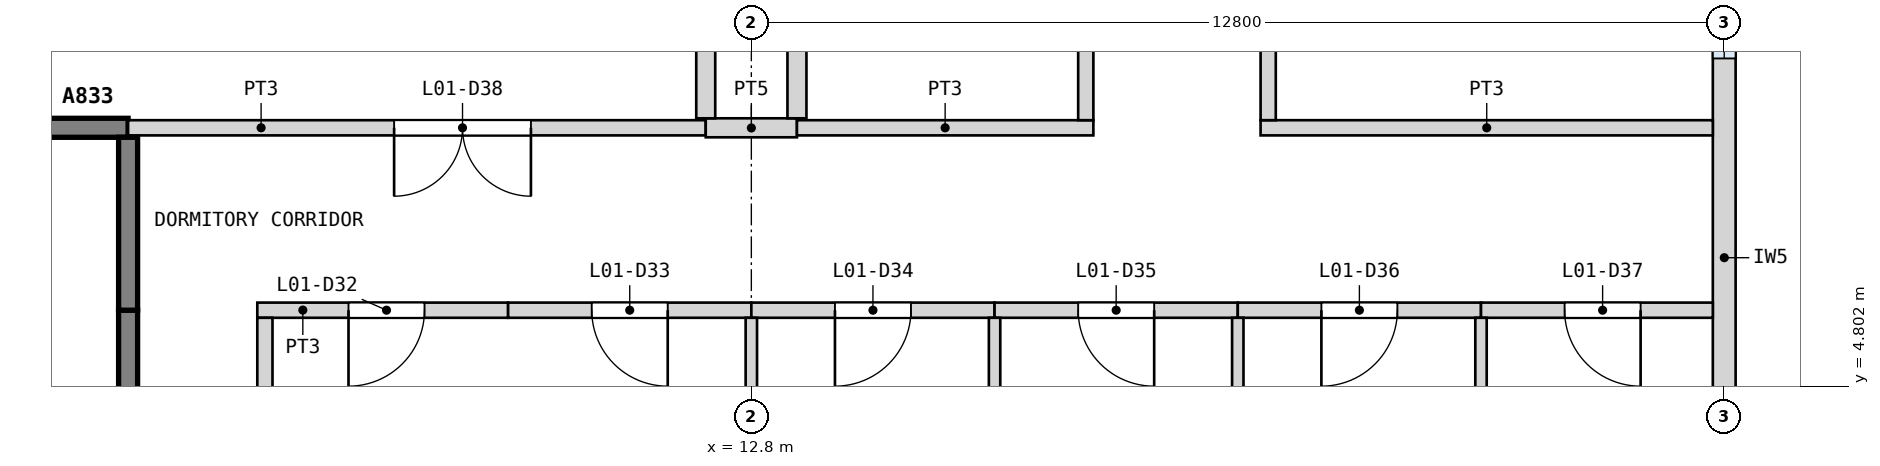
"""IFC4 building model, lengths in metres.
Left out: names, types, materials, properties, quantities, classifications, styles, units other than length and angle.
Written with IfcOpenShell. Run it as: python <this file> out.ifc"""

import sys

from ifc_helpers import new_model, si_unit, direction, frame, frame_2d, origin, place, context, subcontext, project, spatial, rectangle, extrude, element, fill, save


model = new_model("IFC4")
c1 = context("Model", 3, precision=1e-05, world=origin(), true_north=direction((0.0, 1.0)))
c2 = subcontext(c1, "Body", "Model", "MODEL_VIEW")
j1 = project(units=[si_unit("LENGTHUNIT", "METRE"), si_unit("PLANEANGLEUNIT", "RADIAN")], contexts=[c1])
p1 = place(None, origin())
s1 = spatial("IfcSite", under=j1, at=p1, CompositionType="ELEMENT")
p2 = place(p1, origin())
s2 = spatial("IfcBuilding", under=s1, at=p2, CompositionType="ELEMENT")
p3 = place(p2, frame((0.0, 0.0, 4.2)))
s3 = spatial("IfcBuildingStorey", under=s2, at=p3, CompositionType="ELEMENT", Elevation=4.2)
p4 = place(p3, frame((25.6, 0.3, 0.0), z_axis=(0.0, 0.0, 1.0), x_axis=(0.0, 1.0, 0.0)))
e1 = element("IfcWall", 1, at=p4, inside=s3, PredefinedType="SOLIDWALL", context=c2, shape_type="SweptSolid", body=[
    extrude(rectangle(XDim=13.8, YDim=0.3, at=frame_2d((6.9, 0.0))), origin(), (0.0, 0.0, 1.0), 2.9),
])
p5 = place(p4, frame((1.975, 0.0, 1.0)))
e2 = element("IfcOpeningElement", 2, at=p5, cuts=e1, PredefinedType="OPENING", context=c2, shape_type="SweptSolid", body=[
    extrude(rectangle(XDim=1.6, YDim=1.8, at=frame_2d((0.8, 0.9))), frame((0.0, 0.16, 0.0), z_axis=(0.0, -1.0, 0.0), x_axis=(1.0, 0.0, 0.0)), (0.0, 0.0, 1.0), 0.32),
])
p6 = place(p4, frame((8.812, 0.0, 1.0)))
e3 = element("IfcOpeningElement", 3, at=p6, cuts=e1, PredefinedType="OPENING", context=c2, shape_type="SweptSolid", body=[
    extrude(rectangle(XDim=1.6, YDim=1.8, at=frame_2d((0.8, 0.9))), frame((0.0, 0.16, 0.0), z_axis=(0.0, -1.0, 0.0), x_axis=(1.0, 0.0, 0.0)), (0.0, 0.0, 1.0), 0.32),
])
p7 = place(p4, frame((11.712, 0.0, 1.0)))
e4 = element("IfcOpeningElement", 4, at=p7, cuts=e1, PredefinedType="OPENING", context=c2, shape_type="SweptSolid", body=[
    extrude(rectangle(XDim=1.6, YDim=1.8, at=frame_2d((0.8, 0.9))), frame((0.0, 0.16, 0.0), z_axis=(0.0, -1.0, 0.0), x_axis=(1.0, 0.0, 0.0)), (0.0, 0.0, 1.0), 0.32),
])
p8 = place(p3, frame((6.3, 5.8, 0.0), z_axis=(0.0, 0.0, 1.0), x_axis=(1.0, 0.0, 0.0)))
e5 = element("IfcWall", 5, at=p8, inside=s3, PredefinedType="PARTITIONING", context=c2, shape_type="SweptSolid", body=[
    extrude(rectangle(XDim=3.3, YDim=0.2, at=frame_2d((1.65, 0.0))), origin(), (0.0, 0.0, 1.0), 3.9),
])
p9 = place(p8, frame((1.2, 0.0, 0.0)))
e6 = element("IfcOpeningElement", 6, at=p9, cuts=e5, PredefinedType="OPENING", context=c2, shape_type="SweptSolid", body=[
    extrude(rectangle(XDim=1.0, YDim=2.1, at=frame_2d((0.5, 1.05))), frame((0.0, 0.11, 0.0), z_axis=(0.0, -1.0, 0.0), x_axis=(1.0, 0.0, 0.0)), (0.0, 0.0, 1.0), 0.22),
])
p10 = place(p3, frame((9.6, 5.8, 0.0), z_axis=(0.0, 0.0, 1.0), x_axis=(1.0, 0.0, 0.0)))
e7 = element("IfcWall", 7, at=p10, inside=s3, PredefinedType="PARTITIONING", context=c2, shape_type="SweptSolid", body=[
    extrude(rectangle(XDim=3.2, YDim=0.2, at=frame_2d((1.6, 0.0))), origin(), (0.0, 0.0, 1.0), 3.9),
])
p11 = place(p10, frame((1.1, 0.0, 0.0)))
e8 = element("IfcOpeningElement", 8, at=p11, cuts=e7, PredefinedType="OPENING", context=c2, shape_type="SweptSolid", body=[
    extrude(rectangle(XDim=1.0, YDim=2.1, at=frame_2d((0.5, 1.05))), frame((0.0, 0.11, 0.0), z_axis=(0.0, -1.0, 0.0), x_axis=(1.0, 0.0, 0.0)), (0.0, 0.0, 1.0), 0.22),
])
p12 = place(p3, frame((12.8, 5.8, 0.0), z_axis=(0.0, 0.0, 1.0), x_axis=(1.0, 0.0, 0.0)))
e9 = element("IfcWall", 9, at=p12, inside=s3, PredefinedType="PARTITIONING", context=c2, shape_type="SweptSolid", body=[
    extrude(rectangle(XDim=3.2, YDim=0.2, at=frame_2d((1.6, 0.0))), origin(), (0.0, 0.0, 1.0), 3.9),
])
p13 = place(p12, frame((1.1, 0.0, 0.0)))
e10 = element("IfcOpeningElement", 10, at=p13, cuts=e9, PredefinedType="OPENING", context=c2, shape_type="SweptSolid", body=[
    extrude(rectangle(XDim=1.0, YDim=2.1, at=frame_2d((0.5, 1.05))), frame((0.0, 0.11, 0.0), z_axis=(0.0, -1.0, 0.0), x_axis=(1.0, 0.0, 0.0)), (0.0, 0.0, 1.0), 0.22),
])
p14 = place(p3, frame((16.0, 5.8, 0.0), z_axis=(0.0, 0.0, 1.0), x_axis=(1.0, 0.0, 0.0)))
e11 = element("IfcWall", 11, at=p14, inside=s3, PredefinedType="PARTITIONING", context=c2, shape_type="SweptSolid", body=[
    extrude(rectangle(XDim=3.2, YDim=0.2, at=frame_2d((1.6, 0.0))), origin(), (0.0, 0.0, 1.0), 3.9),
])
p15 = place(p14, frame((1.1, 0.0, 0.0)))
e12 = element("IfcOpeningElement", 12, at=p15, cuts=e11, PredefinedType="OPENING", context=c2, shape_type="SweptSolid", body=[
    extrude(rectangle(XDim=1.0, YDim=2.1, at=frame_2d((0.5, 1.05))), frame((0.0, 0.11, 0.0), z_axis=(0.0, -1.0, 0.0), x_axis=(1.0, 0.0, 0.0)), (0.0, 0.0, 1.0), 0.22),
])
p16 = place(p3, frame((19.2, 5.8, 0.0), z_axis=(0.0, 0.0, 1.0), x_axis=(1.0, 0.0, 0.0)))
e13 = element("IfcWall", 13, at=p16, inside=s3, PredefinedType="PARTITIONING", context=c2, shape_type="SweptSolid", body=[
    extrude(rectangle(XDim=3.2, YDim=0.2, at=frame_2d((1.6, 0.0))), origin(), (0.0, 0.0, 1.0), 3.9),
])
p17 = place(p16, frame((1.1, 0.0, 0.0)))
e14 = element("IfcOpeningElement", 14, at=p17, cuts=e13, PredefinedType="OPENING", context=c2, shape_type="SweptSolid", body=[
    extrude(rectangle(XDim=1.0, YDim=2.1, at=frame_2d((0.5, 1.05))), frame((0.0, 0.11, 0.0), z_axis=(0.0, -1.0, 0.0), x_axis=(1.0, 0.0, 0.0)), (0.0, 0.0, 1.0), 0.22),
])
p18 = place(p3, frame((22.4, 5.8, 0.0), z_axis=(0.0, 0.0, 1.0), x_axis=(1.0, 0.0, 0.0)))
e15 = element("IfcWall", 15, at=p18, inside=s3, PredefinedType="PARTITIONING", context=c2, shape_type="SweptSolid", body=[
    extrude(rectangle(XDim=3.05, YDim=0.2, at=frame_2d((1.525, 0.0))), origin(), (0.0, 0.0, 1.0), 3.9),
])
p19 = place(p18, frame((1.1, 0.0, 0.0)))
e16 = element("IfcOpeningElement", 16, at=p19, cuts=e15, PredefinedType="OPENING", context=c2, shape_type="SweptSolid", body=[
    extrude(rectangle(XDim=1.0, YDim=2.1, at=frame_2d((0.5, 1.05))), frame((0.0, 0.11, 0.0), z_axis=(0.0, -1.0, 0.0), x_axis=(1.0, 0.0, 0.0)), (0.0, 0.0, 1.0), 0.22),
])
p20 = place(p3, frame((1.0, 8.2, 0.0), z_axis=(0.0, 0.0, 1.0), x_axis=(1.0, 0.0, 0.0)))
e17 = element("IfcWall", 17, at=p20, inside=s3, PredefinedType="SHEAR", context=c2, shape_type="SweptSolid", body=[
    extrude(rectangle(XDim=3.6, YDim=0.25, at=frame_2d((1.8, 0.0))), origin(), (0.0, 0.0, 1.0), 3.9),
])
p21 = place(p3, frame((4.6, 8.2, 0.0), z_axis=(0.0, 0.0, 1.0), x_axis=(1.0, 0.0, 0.0)))
e18 = element("IfcWall", 18, at=p21, inside=s3, PredefinedType="PARTITIONING", context=c2, shape_type="SweptSolid", body=[
    extrude(rectangle(XDim=7.6, YDim=0.2, at=frame_2d((3.8, 0.0))), origin(), (0.0, 0.0, 1.0), 3.9),
])
p22 = place(p21, frame((3.5, 0.0, 0.0)))
e19 = element("IfcOpeningElement", 19, at=p22, cuts=e18, PredefinedType="OPENING", context=c2, shape_type="SweptSolid", body=[
    extrude(rectangle(XDim=1.8, YDim=2.1, at=frame_2d((0.9, 1.05))), frame((0.0, 0.11, 0.0), z_axis=(0.0, -1.0, 0.0), x_axis=(1.0, 0.0, 0.0)), (0.0, 0.0, 1.0), 0.22),
])
p23 = place(p3, frame((12.2, 8.2, 0.0), z_axis=(0.0, 0.0, 1.0), x_axis=(1.0, 0.0, 0.0)))
e20 = element("IfcWall", 20, at=p23, inside=s3, PredefinedType="PARTITIONING", context=c2, shape_type="SweptSolid", body=[
    extrude(rectangle(XDim=1.2, YDim=0.25, at=frame_2d((0.6, 0.0))), origin(), (0.0, 0.0, 1.0), 3.9),
])
p24 = place(p3, frame((13.4, 8.2, 0.0), z_axis=(0.0, 0.0, 1.0), x_axis=(1.0, 0.0, 0.0)))
e21 = element("IfcWall", 21, at=p24, inside=s3, PredefinedType="PARTITIONING", context=c2, shape_type="SweptSolid", body=[
    extrude(rectangle(XDim=3.9, YDim=0.2, at=frame_2d((1.95, 0.0))), origin(), (0.0, 0.0, 1.0), 3.9),
])
p25 = place(p3, frame((19.5, 8.2, 0.0), z_axis=(0.0, 0.0, 1.0), x_axis=(1.0, 0.0, 0.0)))
e22 = element("IfcWall", 22, at=p25, inside=s3, PredefinedType="PARTITIONING", context=c2, shape_type="SweptSolid", body=[
    extrude(rectangle(XDim=5.95, YDim=0.2, at=frame_2d((2.975, 0.0))), origin(), (0.0, 0.0, 1.0), 3.9),
])
p26 = place(p3, frame((4.6, 2.325, 0.0), z_axis=(0.0, 0.0, 1.0), x_axis=(0.0, 1.0, 0.0)))
e23 = element("IfcWall", 23, at=p26, inside=s3, PredefinedType="SHEAR", context=c2, shape_type="SweptSolid", body=[
    extrude(rectangle(XDim=3.475, YDim=0.25, at=frame_2d((1.738, 0.0))), origin(), (0.0, 0.0, 1.0), 3.9),
])
p27 = place(p3, frame((4.6, 5.8, 0.0), z_axis=(0.0, 0.0, 1.0), x_axis=(0.0, 1.0, 0.0)))
e24 = element("IfcWall", 24, at=p27, inside=s3, PredefinedType="SHEAR", context=c2, shape_type="SweptSolid", body=[
    extrude(rectangle(XDim=2.275, YDim=0.25, at=frame_2d((1.137, 0.0))), origin(), (0.0, 0.0, 1.0), 3.9),
])
p28 = place(p3, frame((6.4, 0.15, 0.0), z_axis=(0.0, 0.0, 1.0), x_axis=(0.0, 1.0, 0.0)))
e25 = element("IfcWall", 25, at=p28, inside=s3, PredefinedType="PARTITIONING", context=c2, shape_type="SweptSolid", body=[
    extrude(rectangle(XDim=5.55, YDim=0.2, at=frame_2d((2.775, 0.0))), origin(), (0.0, 0.0, 1.0), 2.9),
])
p29 = place(p3, frame((12.2, 8.325, 0.0), z_axis=(0.0, 0.0, 1.0), x_axis=(0.0, 1.0, 0.0)))
e26 = element("IfcWall", 26, at=p29, inside=s3, PredefinedType="PARTITIONING", context=c2, shape_type="SweptSolid", body=[
    extrude(rectangle(XDim=10.025, YDim=0.25, at=frame_2d((5.013, 0.0))), origin(), (0.0, 0.0, 1.0), 3.9),
])
p30 = place(p3, frame((12.8, 0.27, 0.0), z_axis=(0.0, 0.0, 1.0), x_axis=(0.0, 1.0, 0.0)))
e27 = element("IfcWall", 27, at=p30, inside=s3, PredefinedType="PARTITIONING", context=c2, shape_type="SweptSolid", body=[
    extrude(rectangle(XDim=5.43, YDim=0.15, at=frame_2d((2.715, 0.0))), origin(), (0.0, 0.0, 1.0), 2.9),
])
p31 = place(p3, frame((13.4, 8.325, 0.0), z_axis=(0.0, 0.0, 1.0), x_axis=(0.0, 1.0, 0.0)))
e28 = element("IfcWall", 28, at=p31, inside=s3, PredefinedType="PARTITIONING", context=c2, shape_type="SweptSolid", body=[
    extrude(rectangle(XDim=3.188, YDim=0.25, at=frame_2d((1.594, 0.0))), origin(), (0.0, 0.0, 1.0), 3.9),
])
p32 = place(p3, frame((16.0, 0.15, 0.0), z_axis=(0.0, 0.0, 1.0), x_axis=(0.0, 1.0, 0.0)))
e29 = element("IfcWall", 29, at=p32, inside=s3, PredefinedType="PARTITIONING", context=c2, shape_type="SweptSolid", body=[
    extrude(rectangle(XDim=5.55, YDim=0.15, at=frame_2d((2.775, 0.0))), origin(), (0.0, 0.0, 1.0), 3.0),
])
p33 = place(p3, frame((17.2, 8.3, 0.0), z_axis=(0.0, 0.0, 1.0), x_axis=(0.0, 1.0, 0.0)))
e30 = element("IfcWall", 30, at=p33, inside=s3, PredefinedType="PARTITIONING", context=c2, shape_type="SweptSolid", body=[
    extrude(rectangle(XDim=3.212, YDim=0.2, at=frame_2d((1.606, 0.0))), origin(), (0.0, 0.0, 1.0), 3.9),
])
p34 = place(p33, frame((1.1, 0.0, 0.0)))
e31 = element("IfcOpeningElement", 31, at=p34, cuts=e30, PredefinedType="OPENING", context=c2, shape_type="SweptSolid", body=[
    extrude(rectangle(XDim=1.0, YDim=2.1, at=frame_2d((0.5, 1.05))), frame((0.0, 0.11, 0.0), z_axis=(0.0, -1.0, 0.0), x_axis=(1.0, 0.0, 0.0)), (0.0, 0.0, 1.0), 0.22),
])
p35 = place(p3, frame((19.2, 0.15, 0.0), z_axis=(0.0, 0.0, 1.0), x_axis=(0.0, 1.0, 0.0)))
e32 = element("IfcWall", 32, at=p35, inside=s3, PredefinedType="PARTITIONING", context=c2, shape_type="SweptSolid", body=[
    extrude(rectangle(XDim=5.55, YDim=0.15, at=frame_2d((2.775, 0.0))), origin(), (0.0, 0.0, 1.0), 2.9),
])
p36 = place(p3, frame((19.6, 8.3, 0.0), z_axis=(0.0, 0.0, 1.0), x_axis=(0.0, 1.0, 0.0)))
e33 = element("IfcWall", 33, at=p36, inside=s3, PredefinedType="PARTITIONING", context=c2, shape_type="SweptSolid", body=[
    extrude(rectangle(XDim=3.225, YDim=0.2, at=frame_2d((1.612, 0.0))), origin(), (0.0, 0.0, 1.0), 3.9),
])
p37 = place(p36, frame((1.1, 0.0, 0.0)))
e34 = element("IfcOpeningElement", 34, at=p37, cuts=e33, PredefinedType="OPENING", context=c2, shape_type="SweptSolid", body=[
    extrude(rectangle(XDim=1.0, YDim=2.1, at=frame_2d((0.5, 1.05))), frame((0.0, 0.11, 0.0), z_axis=(0.0, -1.0, 0.0), x_axis=(1.0, 0.0, 0.0)), (0.0, 0.0, 1.0), 0.22),
])
p38 = place(p3, frame((22.4, 0.15, 0.0), z_axis=(0.0, 0.0, 1.0), x_axis=(0.0, 1.0, 0.0)))
e35 = element("IfcWall", 35, at=p38, inside=s3, PredefinedType="PARTITIONING", context=c2, shape_type="SweptSolid", body=[
    extrude(rectangle(XDim=5.55, YDim=0.15, at=frame_2d((2.775, 0.0))), origin(), (0.0, 0.0, 1.0), 3.0),
])
p39 = place(p9, frame((1.0, 0.0, 0.0), z_axis=(0.0, 0.0, 1.0), x_axis=(-1.0, 0.0, 0.0)))
e36 = element("IfcDoor", 36, at=p39, inside=s3, OperationType="SINGLE_SWING_RIGHT", PredefinedType="DOOR", context=c2, shape_type="SweptSolid", body=[
    extrude(rectangle(XDim=1.0, YDim=2.1, at=frame_2d((0.5, 1.05))), frame((0.0, 0.025, 0.0), z_axis=(0.0, -1.0, 0.0), x_axis=(1.0, 0.0, 0.0)), (0.0, 0.0, 1.0), 0.05),
])
fill(e6, e36)
p40 = place(p11, frame((1.0, 0.0, 0.0), z_axis=(0.0, 0.0, 1.0), x_axis=(-1.0, 0.0, 0.0)))
e37 = element("IfcDoor", 37, at=p40, inside=s3, OperationType="SINGLE_SWING_LEFT", PredefinedType="DOOR", context=c2, shape_type="SweptSolid", body=[
    extrude(rectangle(XDim=1.0, YDim=2.1, at=frame_2d((0.5, 1.05))), frame((0.0, 0.025, 0.0), z_axis=(0.0, -1.0, 0.0), x_axis=(1.0, 0.0, 0.0)), (0.0, 0.0, 1.0), 0.05),
])
fill(e8, e37)
p41 = place(p13, frame((1.0, 0.0, 0.0), z_axis=(0.0, 0.0, 1.0), x_axis=(-1.0, 0.0, 0.0)))
e38 = element("IfcDoor", 38, at=p41, inside=s3, OperationType="SINGLE_SWING_RIGHT", PredefinedType="DOOR", context=c2, shape_type="SweptSolid", body=[
    extrude(rectangle(XDim=1.0, YDim=2.1, at=frame_2d((0.5, 1.05))), frame((0.0, 0.025, 0.0), z_axis=(0.0, -1.0, 0.0), x_axis=(1.0, 0.0, 0.0)), (0.0, 0.0, 1.0), 0.05),
])
fill(e10, e38)
p42 = place(p15, frame((1.0, 0.0, 0.0), z_axis=(0.0, 0.0, 1.0), x_axis=(-1.0, 0.0, 0.0)))
e39 = element("IfcDoor", 39, at=p42, inside=s3, OperationType="SINGLE_SWING_LEFT", PredefinedType="DOOR", context=c2, shape_type="SweptSolid", body=[
    extrude(rectangle(XDim=1.0, YDim=2.1, at=frame_2d((0.5, 1.05))), frame((0.0, 0.025, 0.0), z_axis=(0.0, -1.0, 0.0), x_axis=(1.0, 0.0, 0.0)), (0.0, 0.0, 1.0), 0.05),
])
fill(e12, e39)
p43 = place(p17, frame((1.0, 0.0, 0.0), z_axis=(0.0, 0.0, 1.0), x_axis=(-1.0, 0.0, 0.0)))
e40 = element("IfcDoor", 40, at=p43, inside=s3, OperationType="SINGLE_SWING_RIGHT", PredefinedType="DOOR", context=c2, shape_type="SweptSolid", body=[
    extrude(rectangle(XDim=1.0, YDim=2.1, at=frame_2d((0.5, 1.05))), frame((0.0, 0.025, 0.0), z_axis=(0.0, -1.0, 0.0), x_axis=(1.0, 0.0, 0.0)), (0.0, 0.0, 1.0), 0.05),
])
fill(e14, e40)
p44 = place(p19, frame((1.0, 0.0, 0.0), z_axis=(0.0, 0.0, 1.0), x_axis=(-1.0, 0.0, 0.0)))
e41 = element("IfcDoor", 41, at=p44, inside=s3, OperationType="SINGLE_SWING_LEFT", PredefinedType="DOOR", context=c2, shape_type="SweptSolid", body=[
    extrude(rectangle(XDim=1.0, YDim=2.1, at=frame_2d((0.5, 1.05))), frame((0.0, 0.025, 0.0), z_axis=(0.0, -1.0, 0.0), x_axis=(1.0, 0.0, 0.0)), (0.0, 0.0, 1.0), 0.05),
])
fill(e16, e41)
p45 = place(p22, frame((1.8, 0.0, 0.0), z_axis=(0.0, 0.0, 1.0), x_axis=(-1.0, 0.0, 0.0)))
e42 = element("IfcDoor", 42, at=p45, inside=s3, OperationType="DOUBLE_DOOR_SINGLE_SWING", PredefinedType="DOOR", context=c2, shape_type="SweptSolid", body=[
    extrude(rectangle(XDim=1.8, YDim=2.1, at=frame_2d((0.9, 1.05))), frame((0.0, 0.025, 0.0), z_axis=(0.0, -1.0, 0.0), x_axis=(1.0, 0.0, 0.0)), (0.0, 0.0, 1.0), 0.05),
])
fill(e19, e42)
p46 = place(p6, origin())
e43 = element("IfcWindow", 43, at=p46, inside=s3, PartitioningType="SINGLE_PANEL", PredefinedType="WINDOW", context=c2, shape_type="SweptSolid", body=[
    extrude(rectangle(XDim=1.6, YDim=1.8, at=frame_2d((0.8, 0.9))), frame((0.0, 0.03, 0.0), z_axis=(0.0, -1.0, 0.0), x_axis=(1.0, 0.0, 0.0)), (0.0, 0.0, 1.0), 0.06),
])
fill(e3, e43)
save(model, sys.argv[1])
